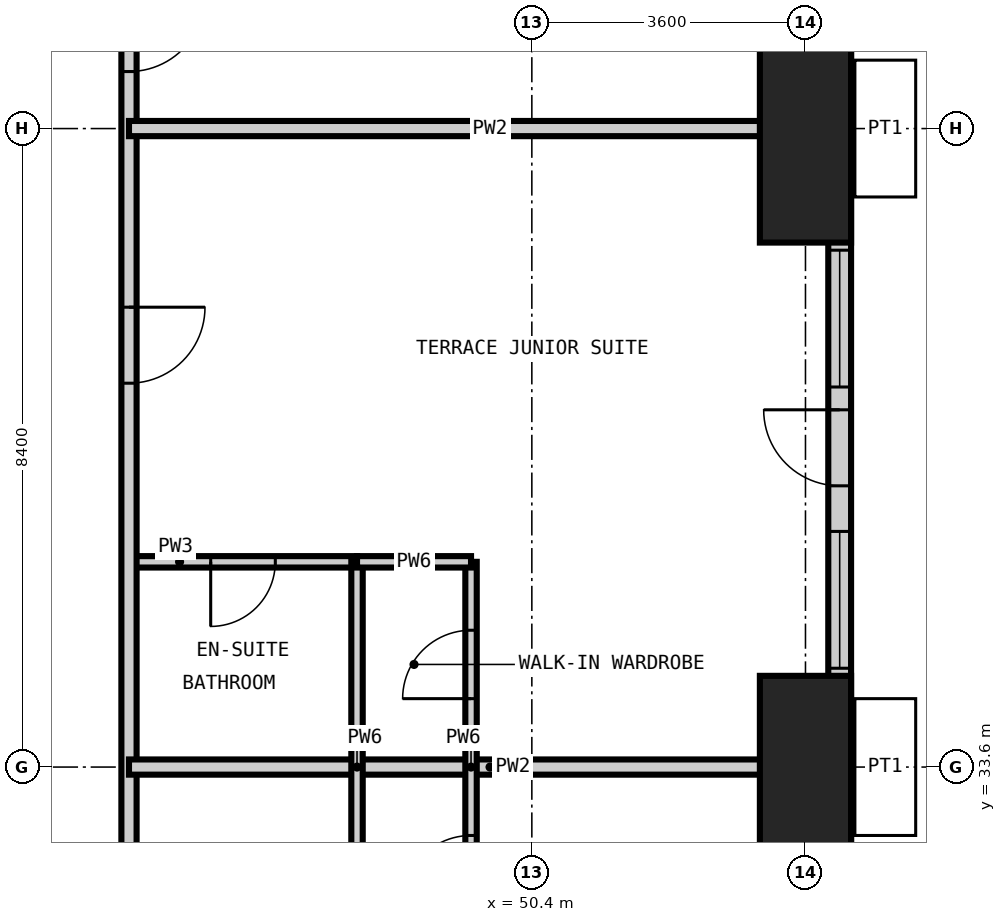
"""IFC4 building model, lengths in metres.
Left out: names, types, materials, properties, quantities, classifications, styles, units other than length and angle.
Written with IfcOpenShell. Run it as: python <this file> out.ifc"""

import sys

from ifc_helpers import new_model, si_unit, direction, frame, frame_2d, origin, origin_2d, place, context, subcontext, project, spatial, rectangle, extrude, element, fill, save


model = new_model("IFC4")
c1 = context("Model", 3, precision=1e-05, world=origin(), true_north=direction((0.0, 1.0)))
c2 = subcontext(c1, "Body", "Model", "MODEL_VIEW")
j1 = project(units=[si_unit("LENGTHUNIT", "METRE"), si_unit("PLANEANGLEUNIT", "RADIAN")], contexts=[c1])
p1 = place(None, origin())
s1 = spatial("IfcSite", under=j1, at=p1, CompositionType="ELEMENT")
p2 = place(p1, origin())
s2 = spatial("IfcBuilding", under=s1, at=p2, CompositionType="ELEMENT")
p3 = place(p2, frame((0.0, 0.0, 93.6)))
s3 = spatial("IfcBuildingStorey", under=s2, at=p3, CompositionType="ELEMENT", Elevation=93.6)
p4 = place(p3, frame((54.0, 33.6, -0.35), z_axis=(0.0, 0.0, 1.0), x_axis=(1.0, 0.0, 0.0)))
e1 = element("IfcColumn", 1, at=p4, inside=s3, PredefinedType="COLUMN", context=c2, shape_type="SweptSolid", body=[
    extrude(rectangle(XDim=1.2, YDim=2.4, at=origin_2d()), origin(), (0.0, 0.0, 1.0), 3.6),
])
p5 = place(p3, frame((54.0, 42.0, -0.35), z_axis=(0.0, 0.0, 1.0), x_axis=(1.0, 0.0, 0.0)))
e2 = element("IfcColumn", 2, at=p5, inside=s3, PredefinedType="COLUMN", context=c2, shape_type="SweptSolid", body=[
    extrude(rectangle(XDim=1.2, YDim=3.0, at=origin_2d()), origin(), (0.0, 0.0, 1.0), 3.6),
])
p6 = place(p3, frame((54.45, 2.7, 0.0), z_axis=(0.0, 0.0, 1.0), x_axis=(0.0, 1.0, 0.0)))
e3 = element("IfcWall", 3, at=p6, inside=s3, PredefinedType="SOLIDWALL", context=c2, shape_type="SweptSolid", body=[
    extrude(rectangle(XDim=49.2, YDim=0.3, at=frame_2d((24.6, 0.0))), origin(), (0.0, 0.0, 1.0), 3.25),
])
p7 = place(p6, frame((2.35, 0.0, 0.0)))
e4 = element("IfcOpeningElement", 4, at=p7, cuts=e3, PredefinedType="OPENING", context=c2, shape_type="SweptSolid", body=[
    extrude(rectangle(XDim=1.0, YDim=2.4, at=frame_2d((0.5, 1.2))), frame((0.0, 0.16, 0.0), z_axis=(0.0, -1.0, 0.0), x_axis=(1.0, 0.0, 0.0)), (0.0, 0.0, 1.0), 0.32),
])
p8 = place(p6, frame((0.3, 0.0, 0.6)))
e5 = element("IfcOpeningElement", 5, at=p8, cuts=e3, PredefinedType="OPENING", context=c2, shape_type="SweptSolid", body=[
    extrude(rectangle(XDim=1.8, YDim=2.1, at=frame_2d((0.9, 1.05))), frame((0.0, 0.16, 0.0), z_axis=(0.0, -1.0, 0.0), x_axis=(1.0, 0.0, 0.0)), (0.0, 0.0, 1.0), 0.32),
])
p9 = place(p6, frame((9.4, 0.0, 0.0)))
e6 = element("IfcOpeningElement", 6, at=p9, cuts=e3, PredefinedType="OPENING", context=c2, shape_type="SweptSolid", body=[
    extrude(rectangle(XDim=1.0, YDim=2.4, at=frame_2d((0.5, 1.2))), frame((0.0, 0.16, 0.0), z_axis=(0.0, -1.0, 0.0), x_axis=(1.0, 0.0, 0.0)), (0.0, 0.0, 1.0), 0.32),
])
p10 = place(p6, frame((7.0, 0.0, 0.6)))
e7 = element("IfcOpeningElement", 7, at=p10, cuts=e3, PredefinedType="OPENING", context=c2, shape_type="SweptSolid", body=[
    extrude(rectangle(XDim=1.8, YDim=2.1, at=frame_2d((0.9, 1.05))), frame((0.0, 0.16, 0.0), z_axis=(0.0, -1.0, 0.0), x_axis=(1.0, 0.0, 0.0)), (0.0, 0.0, 1.0), 0.32),
])
p11 = place(p6, frame((10.7, 0.0, 0.6)))
e8 = element("IfcOpeningElement", 8, at=p11, cuts=e3, PredefinedType="OPENING", context=c2, shape_type="SweptSolid", body=[
    extrude(rectangle(XDim=1.8, YDim=2.1, at=frame_2d((0.9, 1.05))), frame((0.0, 0.16, 0.0), z_axis=(0.0, -1.0, 0.0), x_axis=(1.0, 0.0, 0.0)), (0.0, 0.0, 1.0), 0.32),
])
p12 = place(p6, frame((17.8, 0.0, 0.0)))
e9 = element("IfcOpeningElement", 9, at=p12, cuts=e3, PredefinedType="OPENING", context=c2, shape_type="SweptSolid", body=[
    extrude(rectangle(XDim=1.0, YDim=2.4, at=frame_2d((0.5, 1.2))), frame((0.0, 0.16, 0.0), z_axis=(0.0, -1.0, 0.0), x_axis=(1.0, 0.0, 0.0)), (0.0, 0.0, 1.0), 0.32),
])
p13 = place(p6, frame((15.7, 0.0, 0.6)))
e10 = element("IfcOpeningElement", 10, at=p13, cuts=e3, PredefinedType="OPENING", context=c2, shape_type="SweptSolid", body=[
    extrude(rectangle(XDim=1.8, YDim=2.1, at=frame_2d((0.9, 1.05))), frame((0.0, 0.16, 0.0), z_axis=(0.0, -1.0, 0.0), x_axis=(1.0, 0.0, 0.0)), (0.0, 0.0, 1.0), 0.32),
])
p14 = place(p6, frame((19.4, 0.0, 0.6)))
e11 = element("IfcOpeningElement", 11, at=p14, cuts=e3, PredefinedType="OPENING", context=c2, shape_type="SweptSolid", body=[
    extrude(rectangle(XDim=1.8, YDim=2.1, at=frame_2d((0.9, 1.05))), frame((0.0, 0.16, 0.0), z_axis=(0.0, -1.0, 0.0), x_axis=(1.0, 0.0, 0.0)), (0.0, 0.0, 1.0), 0.32),
])
p15 = place(p6, frame((26.2, 0.0, 0.0)))
e12 = element("IfcOpeningElement", 12, at=p15, cuts=e3, PredefinedType="OPENING", context=c2, shape_type="SweptSolid", body=[
    extrude(rectangle(XDim=1.0, YDim=2.4, at=frame_2d((0.5, 1.2))), frame((0.0, 0.16, 0.0), z_axis=(0.0, -1.0, 0.0), x_axis=(1.0, 0.0, 0.0)), (0.0, 0.0, 1.0), 0.32),
])
p16 = place(p6, frame((23.8, 0.0, 0.6)))
e13 = element("IfcOpeningElement", 13, at=p16, cuts=e3, PredefinedType="OPENING", context=c2, shape_type="SweptSolid", body=[
    extrude(rectangle(XDim=1.8, YDim=2.1, at=frame_2d((0.9, 1.05))), frame((0.0, 0.16, 0.0), z_axis=(0.0, -1.0, 0.0), x_axis=(1.0, 0.0, 0.0)), (0.0, 0.0, 1.0), 0.32),
])
p17 = place(p6, frame((27.8, 0.0, 0.6)))
e14 = element("IfcOpeningElement", 14, at=p17, cuts=e3, PredefinedType="OPENING", context=c2, shape_type="SweptSolid", body=[
    extrude(rectangle(XDim=1.8, YDim=2.1, at=frame_2d((0.9, 1.05))), frame((0.0, 0.16, 0.0), z_axis=(0.0, -1.0, 0.0), x_axis=(1.0, 0.0, 0.0)), (0.0, 0.0, 1.0), 0.32),
])
p18 = place(p6, frame((34.6, 0.0, 0.0)))
e15 = element("IfcOpeningElement", 15, at=p18, cuts=e3, PredefinedType="OPENING", context=c2, shape_type="SweptSolid", body=[
    extrude(rectangle(XDim=1.0, YDim=2.4, at=frame_2d((0.5, 1.2))), frame((0.0, 0.16, 0.0), z_axis=(0.0, -1.0, 0.0), x_axis=(1.0, 0.0, 0.0)), (0.0, 0.0, 1.0), 0.32),
])
p19 = place(p6, frame((32.2, 0.0, 0.6)))
e16 = element("IfcOpeningElement", 16, at=p19, cuts=e3, PredefinedType="OPENING", context=c2, shape_type="SweptSolid", body=[
    extrude(rectangle(XDim=1.8, YDim=2.1, at=frame_2d((0.9, 1.05))), frame((0.0, 0.16, 0.0), z_axis=(0.0, -1.0, 0.0), x_axis=(1.0, 0.0, 0.0)), (0.0, 0.0, 1.0), 0.32),
])
p20 = place(p6, frame((35.9, 0.0, 0.6)))
e17 = element("IfcOpeningElement", 17, at=p20, cuts=e3, PredefinedType="OPENING", context=c2, shape_type="SweptSolid", body=[
    extrude(rectangle(XDim=1.8, YDim=2.1, at=frame_2d((0.9, 1.05))), frame((0.0, 0.16, 0.0), z_axis=(0.0, -1.0, 0.0), x_axis=(1.0, 0.0, 0.0)), (0.0, 0.0, 1.0), 0.32),
])
p21 = place(p6, frame((40.9, 0.0, 0.0)))
e18 = element("IfcOpeningElement", 18, at=p21, cuts=e3, PredefinedType="OPENING", context=c2, shape_type="SweptSolid", body=[
    extrude(rectangle(XDim=1.0, YDim=2.4, at=frame_2d((0.5, 1.2))), frame((0.0, 0.16, 0.0), z_axis=(0.0, -1.0, 0.0), x_axis=(1.0, 0.0, 0.0)), (0.0, 0.0, 1.0), 0.32),
])
p22 = place(p6, frame((45.45, 0.0, 0.0)))
e19 = element("IfcOpeningElement", 19, at=p22, cuts=e3, PredefinedType="OPENING", context=c2, shape_type="SweptSolid", body=[
    extrude(rectangle(XDim=1.0, YDim=2.4, at=frame_2d((0.5, 1.2))), frame((0.0, 0.16, 0.0), z_axis=(0.0, -1.0, 0.0), x_axis=(1.0, 0.0, 0.0)), (0.0, 0.0, 1.0), 0.32),
])
p23 = place(p3, frame((45.1, 36.3, 0.0), z_axis=(0.0, 0.0, 1.0), x_axis=(1.0, 0.0, 0.0)))
e20 = element("IfcWall", 20, at=p23, inside=s3, PredefinedType="PARTITIONING", context=c2, shape_type="SweptSolid", body=[
    extrude(rectangle(XDim=3.0, YDim=0.15, at=frame_2d((1.5, 0.0))), origin(), (0.0, 0.0, 1.0), 3.25),
])
p24 = place(p23, frame((1.075, 0.0, 0.0)))
e21 = element("IfcOpeningElement", 21, at=p24, cuts=e20, PredefinedType="OPENING", context=c2, shape_type="SweptSolid", body=[
    extrude(rectangle(XDim=0.85, YDim=2.1, at=frame_2d((0.425, 1.05))), frame((0.0, 0.085, 0.0), z_axis=(0.0, -1.0, 0.0), x_axis=(1.0, 0.0, 0.0)), (0.0, 0.0, 1.0), 0.17),
])
p25 = place(p3, frame((45.1, 44.5, 0.0), z_axis=(0.0, 0.0, 1.0), x_axis=(0.0, -1.0, 0.0)))
e22 = element("IfcWall", 22, at=p25, inside=s3, PredefinedType="PARTITIONING", context=c2, shape_type="SweptSolid", body=[
    extrude(rectangle(XDim=31.4, YDim=0.2, at=frame_2d((15.7, 0.0))), origin(), (0.0, 0.0, 1.0), 3.25),
])
p26 = place(p25, frame((21.65, 0.0, 0.0)))
e23 = element("IfcOpeningElement", 23, at=p26, cuts=e22, PredefinedType="OPENING", context=c2, shape_type="SweptSolid", body=[
    extrude(rectangle(XDim=1.0, YDim=2.2, at=frame_2d((0.5, 1.1))), frame((0.0, 0.11, 0.0), z_axis=(0.0, -1.0, 0.0), x_axis=(1.0, 0.0, 0.0)), (0.0, 0.0, 1.0), 0.22),
])
p27 = place(p25, frame((15.95, 0.0, 0.0)))
e24 = element("IfcOpeningElement", 24, at=p27, cuts=e22, PredefinedType="OPENING", context=c2, shape_type="SweptSolid", body=[
    extrude(rectangle(XDim=1.0, YDim=2.2, at=frame_2d((0.5, 1.1))), frame((0.0, 0.11, 0.0), z_axis=(0.0, -1.0, 0.0), x_axis=(1.0, 0.0, 0.0)), (0.0, 0.0, 1.0), 0.22),
])
p28 = place(p25, frame((4.85, 0.0, 0.0)))
e25 = element("IfcOpeningElement", 25, at=p28, cuts=e22, PredefinedType="OPENING", context=c2, shape_type="SweptSolid", body=[
    extrude(rectangle(XDim=1.0, YDim=2.2, at=frame_2d((0.5, 1.1))), frame((0.0, 0.11, 0.0), z_axis=(0.0, -1.0, 0.0), x_axis=(1.0, 0.0, 0.0)), (0.0, 0.0, 1.0), 0.22),
])
p29 = place(p25, frame((29.05, 0.0, 0.0)))
e26 = element("IfcOpeningElement", 26, at=p29, cuts=e22, PredefinedType="OPENING", context=c2, shape_type="SweptSolid", body=[
    extrude(rectangle(XDim=1.0, YDim=2.2, at=frame_2d((0.5, 1.1))), frame((0.0, 0.11, 0.0), z_axis=(0.0, -1.0, 0.0), x_axis=(1.0, 0.0, 0.0)), (0.0, 0.0, 1.0), 0.22),
])
p30 = place(p25, frame((0.75, 0.0, 0.0)))
e27 = element("IfcOpeningElement", 27, at=p30, cuts=e22, PredefinedType="OPENING", context=c2, shape_type="SweptSolid", body=[
    extrude(rectangle(XDim=1.0, YDim=2.2, at=frame_2d((0.5, 1.1))), frame((0.0, 0.11, 0.0), z_axis=(0.0, -1.0, 0.0), x_axis=(1.0, 0.0, 0.0)), (0.0, 0.0, 1.0), 0.22),
])
for number, where, z_axis, x_axis in (
    (28, (45.1, 33.6, 0.0), (0.0, 0.0, 1.0), (1.0, 0.0, 0.0)),
    (29, (45.1, 42.0, 0.0), (0.0, 0.0, 1.0), (1.0, 0.0, 0.0)),
):
    element("IfcWall", number, at=place(p3, frame(where, z_axis=z_axis, x_axis=x_axis)), inside=s3, PredefinedType="PARTITIONING", context=c2, shape_type="SweptSolid", body=[
        extrude(rectangle(XDim=9.5, YDim=0.2, at=frame_2d((4.75, 0.0))), origin(), (0.0, 0.0, 1.0), 3.25),
    ])
p31 = place(p3, frame((48.1, 30.9, 0.0), z_axis=(0.0, 0.0, 1.0), x_axis=(0.0, 1.0, 0.0)))
e30 = element("IfcWall", 30, at=p31, inside=s3, PredefinedType="PARTITIONING", context=c2, shape_type="SweptSolid", body=[
    extrude(rectangle(XDim=5.4, YDim=0.15, at=frame_2d((2.7, 0.0))), origin(), (0.0, 0.0, 1.0), 3.25),
])
p32 = place(p3, frame((49.6, 30.9, 0.0), z_axis=(0.0, 0.0, 1.0), x_axis=(0.0, 1.0, 0.0)))
e31 = element("IfcWall", 31, at=p32, inside=s3, PredefinedType="PARTITIONING", context=c2, shape_type="SweptSolid", body=[
    extrude(rectangle(XDim=5.4, YDim=0.15, at=frame_2d((2.7, 0.0))), origin(), (0.0, 0.0, 1.0), 3.25),
])
p33 = place(p32, frame((0.9, 0.0, 0.0)))
e32 = element("IfcOpeningElement", 32, at=p33, cuts=e31, PredefinedType="OPENING", context=c2, shape_type="SweptSolid", body=[
    extrude(rectangle(XDim=0.9, YDim=2.1, at=frame_2d((0.45, 1.05))), frame((0.0, 0.085, 0.0), z_axis=(0.0, -1.0, 0.0), x_axis=(1.0, 0.0, 0.0)), (0.0, 0.0, 1.0), 0.17),
])
p34 = place(p32, frame((3.6, 0.0, 0.0)))
e33 = element("IfcOpeningElement", 33, at=p34, cuts=e31, PredefinedType="OPENING", context=c2, shape_type="SweptSolid", body=[
    extrude(rectangle(XDim=0.9, YDim=2.1, at=frame_2d((0.45, 1.05))), frame((0.0, 0.085, 0.0), z_axis=(0.0, -1.0, 0.0), x_axis=(1.0, 0.0, 0.0)), (0.0, 0.0, 1.0), 0.17),
])
p35 = place(p3, frame((48.1, 36.3, 0.0), z_axis=(0.0, 0.0, 1.0), x_axis=(1.0, 0.0, 0.0)))
e34 = element("IfcWall", 34, at=p35, inside=s3, PredefinedType="PARTITIONING", context=c2, shape_type="SweptSolid", body=[
    extrude(rectangle(XDim=1.5, YDim=0.15, at=frame_2d((0.75, 0.0))), origin(), (0.0, 0.0, 1.0), 3.25),
])
p36 = place(p18, origin())
e35 = element("IfcDoor", 35, at=p36, inside=s3, OperationType="SINGLE_SWING_RIGHT", PredefinedType="DOOR", context=c2, shape_type="SweptSolid", body=[
    extrude(rectangle(XDim=1.0, YDim=2.4, at=frame_2d((0.5, 1.2))), frame((0.0, 0.025, 0.0), z_axis=(0.0, -1.0, 0.0), x_axis=(1.0, 0.0, 0.0)), (0.0, 0.0, 1.0), 0.05),
])
fill(e15, e35)
p37 = place(p19, origin())
e36 = element("IfcWindow", 36, at=p37, inside=s3, PartitioningType="SINGLE_PANEL", PredefinedType="WINDOW", context=c2, shape_type="SweptSolid", body=[
    extrude(rectangle(XDim=1.8, YDim=2.1, at=frame_2d((0.9, 1.05))), frame((0.0, 0.03, 0.0), z_axis=(0.0, -1.0, 0.0), x_axis=(1.0, 0.0, 0.0)), (0.0, 0.0, 1.0), 0.06),
])
fill(e16, e36)
p38 = place(p20, origin())
e37 = element("IfcWindow", 37, at=p38, inside=s3, PartitioningType="SINGLE_PANEL", PredefinedType="WINDOW", context=c2, shape_type="SweptSolid", body=[
    extrude(rectangle(XDim=1.8, YDim=2.1, at=frame_2d((0.9, 1.05))), frame((0.0, 0.03, 0.0), z_axis=(0.0, -1.0, 0.0), x_axis=(1.0, 0.0, 0.0)), (0.0, 0.0, 1.0), 0.06),
])
fill(e17, e37)
p39 = place(p33, origin())
e38 = element("IfcDoor", 38, at=p39, inside=s3, OperationType="SINGLE_SWING_LEFT", PredefinedType="DOOR", context=c2, shape_type="SweptSolid", body=[
    extrude(rectangle(XDim=0.9, YDim=2.1, at=frame_2d((0.45, 1.05))), frame((0.0, 0.025, 0.0), z_axis=(0.0, -1.0, 0.0), x_axis=(1.0, 0.0, 0.0)), (0.0, 0.0, 1.0), 0.05),
])
fill(e32, e38)
p40 = place(p28, origin())
e39 = element("IfcDoor", 39, at=p40, inside=s3, OperationType="SINGLE_SWING_LEFT", PredefinedType="DOOR", context=c2, shape_type="SweptSolid", body=[
    extrude(rectangle(XDim=1.0, YDim=2.2, at=frame_2d((0.5, 1.1))), frame((0.0, 0.025, 0.0), z_axis=(0.0, -1.0, 0.0), x_axis=(1.0, 0.0, 0.0)), (0.0, 0.0, 1.0), 0.05),
])
fill(e25, e39)
p41 = place(p24, frame((0.85, 0.0, 0.0), z_axis=(0.0, 0.0, 1.0), x_axis=(-1.0, 0.0, 0.0)))
e40 = element("IfcDoor", 40, at=p41, inside=s3, OperationType="SINGLE_SWING_RIGHT", PredefinedType="DOOR", context=c2, shape_type="SweptSolid", body=[
    extrude(rectangle(XDim=0.85, YDim=2.1, at=frame_2d((0.425, 1.05))), frame((0.0, 0.025, 0.0), z_axis=(0.0, -1.0, 0.0), x_axis=(1.0, 0.0, 0.0)), (0.0, 0.0, 1.0), 0.05),
])
fill(e21, e40)
p42 = place(p34, origin())
e41 = element("IfcDoor", 41, at=p42, inside=s3, OperationType="SINGLE_SWING_LEFT", PredefinedType="DOOR", context=c2, shape_type="SweptSolid", body=[
    extrude(rectangle(XDim=0.9, YDim=2.1, at=frame_2d((0.45, 1.05))), frame((0.0, 0.025, 0.0), z_axis=(0.0, -1.0, 0.0), x_axis=(1.0, 0.0, 0.0)), (0.0, 0.0, 1.0), 0.05),
])
fill(e33, e41)
p43 = place(p30, origin())
e42 = element("IfcDoor", 42, at=p43, inside=s3, OperationType="SINGLE_SWING_LEFT", PredefinedType="DOOR", context=c2, shape_type="SweptSolid", body=[
    extrude(rectangle(XDim=1.0, YDim=2.2, at=frame_2d((0.5, 1.1))), frame((0.0, 0.025, 0.0), z_axis=(0.0, -1.0, 0.0), x_axis=(1.0, 0.0, 0.0)), (0.0, 0.0, 1.0), 0.05),
])
fill(e27, e42)
save(model, sys.argv[1])
